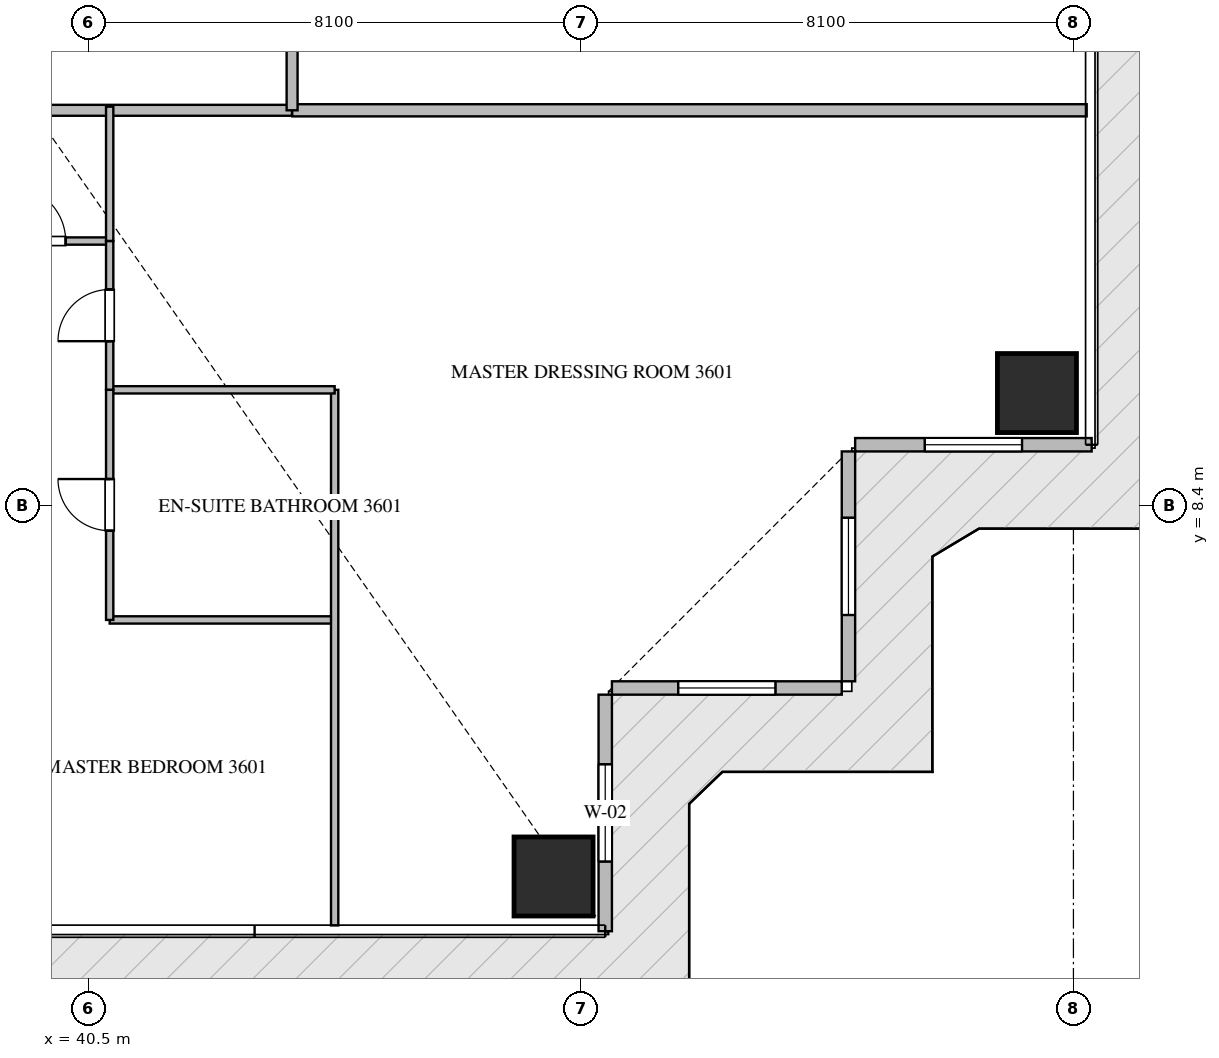
"""IFC4 building model, lengths in metres.
Left out: names, types, materials, properties, quantities, classifications, styles, units other than length and angle.
Written with IfcOpenShell. Run it as: python <this file> out.ifc"""

import sys

from ifc_helpers import new_model, si_unit, direction, frame, frame_2d, origin, origin_2d, place, context, subcontext, project, spatial, rectangle, extrude, source, transform, mapped, element, fill, save


model = new_model("IFC4")
c1 = context("Model", 3, precision=1e-05, world=origin(), true_north=direction((0.0, 1.0)))
c2 = subcontext(c1, "Body", "Model", "MODEL_VIEW")
j1 = project(units=[si_unit("LENGTHUNIT", "METRE"), si_unit("PLANEANGLEUNIT", "RADIAN")], contexts=[c1])
p1 = place(None, origin())
s1 = spatial("IfcSite", under=j1, at=p1, CompositionType="ELEMENT")
p2 = place(p1, origin())
s2 = spatial("IfcBuilding", under=s1, at=p2, CompositionType="ELEMENT")
p3 = place(p2, frame((0.0, 0.0, 146.4)))
s3 = spatial("IfcBuildingStorey", under=s2, at=p3, CompositionType="ELEMENT", Elevation=146.4)
m1 = source(origin(), c2, "Body", "SweptSolid", [
    extrude(rectangle(XDim=1.3, YDim=1.3, at=origin_2d()), origin(), (0.0, 0.0, 1.0), 3.75),
])
for number, where, z_axis, x_axis in (
    (1, (48.15, 2.3, -0.26), (0.0, 0.0, 1.0), (1.0, 0.0, 0.0)),
    (2, (56.1, 10.25, -0.26), (0.0, 0.0, 1.0), (1.0, 0.0, 0.0)),
):
    element("IfcColumn", number, at=place(p3, frame(where, z_axis=z_axis, x_axis=x_axis)), inside=s3, PredefinedType="COLUMN", context=c2, shape_type="MappedRepresentation", body=[
        mapped(m1, transform((0.0, 0.0, 0.0), scale=1.0)),
    ])
p4 = place(p3, frame((49.0, 1.4, 0.0), z_axis=(0.0, 0.0, 1.0), x_axis=(0.0, 1.0, 0.0)))
e3 = element("IfcWall", 3, at=p4, inside=s3, PredefinedType="ELEMENTEDWALL", context=c2, shape_type="SweptSolid", body=[
    extrude(rectangle(XDim=3.89, YDim=0.22, at=frame_2d((1.945, 0.0))), origin(), (0.0, 0.0, 1.0), 3.475),
])
p5 = place(p4, frame((1.145, 0.0, 0.65)))
e4 = element("IfcOpeningElement", 4, at=p5, cuts=e3, PredefinedType="OPENING", context=c2, shape_type="SweptSolid", body=[
    extrude(rectangle(XDim=1.6, YDim=2.1, at=frame_2d((0.8, 1.05))), frame((0.0, 0.12, 0.0), z_axis=(0.0, -1.0, 0.0), x_axis=(1.0, 0.0, 0.0)), (0.0, 0.0, 1.0), 0.24),
])
p6 = place(p3, frame((49.11, 5.4, 0.0), z_axis=(0.0, 0.0, 1.0), x_axis=(1.0, 0.0, 0.0)))
e5 = element("IfcWall", 5, at=p6, inside=s3, PredefinedType="ELEMENTEDWALL", context=c2, shape_type="SweptSolid", body=[
    extrude(rectangle(XDim=3.78, YDim=0.22, at=frame_2d((1.89, 0.0))), origin(), (0.0, 0.0, 1.0), 3.475),
])
p7 = place(p6, frame((1.09, 0.0, 0.65)))
e6 = element("IfcOpeningElement", 6, at=p7, cuts=e5, PredefinedType="OPENING", context=c2, shape_type="SweptSolid", body=[
    extrude(rectangle(XDim=1.6, YDim=2.1, at=frame_2d((0.8, 1.05))), frame((0.0, 0.12, 0.0), z_axis=(0.0, -1.0, 0.0), x_axis=(1.0, 0.0, 0.0)), (0.0, 0.0, 1.0), 0.24),
])
p8 = place(p3, frame((53.0, 5.51, 0.0), z_axis=(0.0, 0.0, 1.0), x_axis=(0.0, 1.0, 0.0)))
e7 = element("IfcWall", 7, at=p8, inside=s3, PredefinedType="ELEMENTEDWALL", context=c2, shape_type="SweptSolid", body=[
    extrude(rectangle(XDim=3.78, YDim=0.22, at=frame_2d((1.89, 0.0))), origin(), (0.0, 0.0, 1.0), 3.475),
])
p9 = place(p8, frame((1.09, 0.0, 0.65)))
e8 = element("IfcOpeningElement", 8, at=p9, cuts=e7, PredefinedType="OPENING", context=c2, shape_type="SweptSolid", body=[
    extrude(rectangle(XDim=1.6, YDim=2.1, at=frame_2d((0.8, 1.05))), frame((0.0, 0.12, 0.0), z_axis=(0.0, -1.0, 0.0), x_axis=(1.0, 0.0, 0.0)), (0.0, 0.0, 1.0), 0.24),
])
p10 = place(p3, frame((53.11, 9.4, 0.0), z_axis=(0.0, 0.0, 1.0), x_axis=(1.0, 0.0, 0.0)))
e9 = element("IfcWall", 9, at=p10, inside=s3, PredefinedType="ELEMENTEDWALL", context=c2, shape_type="SweptSolid", body=[
    extrude(rectangle(XDim=3.89, YDim=0.22, at=frame_2d((1.945, 0.0))), origin(), (0.0, 0.0, 1.0), 3.475),
])
p11 = place(p10, frame((1.145, 0.0, 0.65)))
e10 = element("IfcOpeningElement", 10, at=p11, cuts=e9, PredefinedType="OPENING", context=c2, shape_type="SweptSolid", body=[
    extrude(rectangle(XDim=1.6, YDim=2.1, at=frame_2d((0.8, 1.05))), frame((0.0, 0.12, 0.0), z_axis=(0.0, -1.0, 0.0), x_axis=(1.0, 0.0, 0.0)), (0.0, 0.0, 1.0), 0.24),
])
p12 = place(p3, frame((43.85, 14.9, 0.0), z_axis=(0.0, 0.0, 1.0), x_axis=(1.0, 0.0, 0.0)))
e11 = element("IfcWall", 11, at=p12, inside=s3, PredefinedType="PARTITIONING", context=c2, shape_type="SweptSolid", body=[
    extrude(rectangle(XDim=13.068, YDim=0.2, at=frame_2d((6.534, 0.0))), origin(), (0.0, 0.0, 1.0), 3.49),
])
p13 = place(p3, frame((20.952, 14.9, 0.0), z_axis=(0.0, 0.0, 1.0), x_axis=(1.0, 0.0, 0.0)))
e12 = element("IfcWall", 12, at=p13, inside=s3, PredefinedType="PARTITIONING", context=c2, shape_type="SweptSolid", body=[
    extrude(rectangle(XDim=22.896, YDim=0.18, at=frame_2d((11.448, 0.0))), origin(), (0.0, 0.0, 1.0), 3.49),
])
p14 = place(p13, frame((7.51, 0.0, 0.0)))
e13 = element("IfcOpeningElement", 13, at=p14, cuts=e12, PredefinedType="OPENING", context=c2, shape_type="SweptSolid", body=[
    extrude(rectangle(XDim=1.0, YDim=2.15, at=frame_2d((0.5, 1.075))), frame((0.0, 0.1, 0.0), z_axis=(0.0, -1.0, 0.0), x_axis=(1.0, 0.0, 0.0)), (0.0, 0.0, 1.0), 0.2),
])
p15 = place(p3, frame((43.85, 14.9, 0.0), z_axis=(0.0, 0.0, 1.0), x_axis=(0.0, 1.0, 0.0)))
e14 = element("IfcWall", 14, at=p15, inside=s3, PredefinedType="PARTITIONING", context=c2, shape_type="SweptSolid", body=[
    extrude(rectangle(XDim=18.7, YDim=0.18, at=frame_2d((9.35, 0.0))), origin(), (0.0, 0.0, 1.0), 3.49),
])
p16 = place(p15, frame((1.805, 0.0, 0.0)))
e15 = element("IfcOpeningElement", 15, at=p16, cuts=e14, PredefinedType="OPENING", context=c2, shape_type="SweptSolid", body=[
    extrude(rectangle(XDim=1.0, YDim=2.15, at=frame_2d((0.5, 1.075))), frame((0.0, 0.1, 0.0), z_axis=(0.0, -1.0, 0.0), x_axis=(1.0, 0.0, 0.0)), (0.0, 0.0, 1.0), 0.2),
])
p17 = place(p3, frame((38.502, 12.75, 0.0), z_axis=(0.0, 0.0, 1.0), x_axis=(1.0, 0.0, 0.0)))
e16 = element("IfcWall", 16, at=p17, inside=s3, PredefinedType="PARTITIONING", context=c2, shape_type="SweptSolid", body=[
    extrude(rectangle(XDim=2.348, YDim=0.12, at=frame_2d((1.174, 0.0))), origin(), (0.0, 0.0, 1.0), 3.49),
])
p18 = place(p17, frame((0.724, 0.0, 0.0)))
e17 = element("IfcOpeningElement", 17, at=p18, cuts=e16, PredefinedType="OPENING", context=c2, shape_type="SweptSolid", body=[
    extrude(rectangle(XDim=0.9, YDim=2.1, at=frame_2d((0.45, 1.05))), frame((0.0, 0.07, 0.0), z_axis=(0.0, -1.0, 0.0), x_axis=(1.0, 0.0, 0.0)), (0.0, 0.0, 1.0), 0.14),
])
p19 = place(p3, frame((40.85, 6.519, 0.0), z_axis=(0.0, 0.0, 1.0), x_axis=(1.0, 0.0, 0.0)))
e18 = element("IfcWall", 18, at=p19, inside=s3, PredefinedType="PARTITIONING", context=c2, shape_type="SweptSolid", body=[
    extrude(rectangle(XDim=3.7, YDim=0.12, at=frame_2d((1.85, 0.0))), origin(), (0.0, 0.0, 1.0), 3.49),
])
p20 = place(p3, frame((44.55, 1.495, 0.0), z_axis=(0.0, 0.0, 1.0), x_axis=(0.0, 1.0, 0.0)))
e19 = element("IfcWall", 19, at=p20, inside=s3, PredefinedType="PARTITIONING", context=c2, shape_type="SweptSolid", body=[
    extrude(rectangle(XDim=8.808, YDim=0.12, at=frame_2d((4.404, 0.0))), origin(), (0.0, 0.0, 1.0), 3.49),
])
p21 = place(p3, frame((40.85, 10.303, 0.0), z_axis=(0.0, 0.0, 1.0), x_axis=(1.0, 0.0, 0.0)))
e20 = element("IfcWall", 20, at=p21, inside=s3, PredefinedType="PARTITIONING", context=c2, shape_type="SweptSolid", body=[
    extrude(rectangle(XDim=3.7, YDim=0.12, at=frame_2d((1.85, 0.0))), origin(), (0.0, 0.0, 1.0), 2.972),
])
p22 = place(p3, frame((40.85, 6.519, 0.0), z_axis=(0.0, 0.0, 1.0), x_axis=(0.0, 1.0, 0.0)))
e21 = element("IfcWall", 21, at=p22, inside=s3, PredefinedType="PARTITIONING", context=c2, shape_type="SweptSolid", body=[
    extrude(rectangle(XDim=3.784, YDim=0.12, at=frame_2d((1.892, 0.0))), origin(), (0.0, 0.0, 1.0), 3.49),
])
p23 = place(p22, frame((1.467, 0.0, 0.0)))
e22 = element("IfcOpeningElement", 22, at=p23, cuts=e21, PredefinedType="OPENING", context=c2, shape_type="SweptSolid", body=[
    extrude(rectangle(XDim=0.85, YDim=2.1, at=frame_2d((0.425, 1.05))), frame((0.0, 0.07, 0.0), z_axis=(0.0, -1.0, 0.0), x_axis=(1.0, 0.0, 0.0)), (0.0, 0.0, 1.0), 0.14),
])
p24 = place(p3, frame((40.85, 10.305, 0.0), z_axis=(0.0, 0.0, 1.0), x_axis=(0.0, 1.0, 0.0)))
e23 = element("IfcWall", 23, at=p24, inside=s3, PredefinedType="PARTITIONING", context=c2, shape_type="SweptSolid", body=[
    extrude(rectangle(XDim=2.445, YDim=0.12, at=frame_2d((1.223, 0.0))), origin(), (0.0, 0.0, 1.0), 3.49),
])
p25 = place(p24, frame((0.798, 0.0, 0.0)))
e24 = element("IfcOpeningElement", 24, at=p25, cuts=e23, PredefinedType="OPENING", context=c2, shape_type="SweptSolid", body=[
    extrude(rectangle(XDim=0.85, YDim=2.1, at=frame_2d((0.425, 1.05))), frame((0.0, 0.07, 0.0), z_axis=(0.0, -1.0, 0.0), x_axis=(1.0, 0.0, 0.0)), (0.0, 0.0, 1.0), 0.14),
])
p26 = place(p3, frame((40.85, 12.752, 0.0), z_axis=(0.0, 0.0, 1.0), x_axis=(0.0, 1.0, 0.0)))
e25 = element("IfcWall", 25, at=p26, inside=s3, PredefinedType="PARTITIONING", context=c2, shape_type="SweptSolid", body=[
    extrude(rectangle(XDim=2.208, YDim=0.12, at=frame_2d((1.104, 0.0))), origin(), (0.0, 0.0, 1.0), 3.49),
])
m2 = source(origin(), c2, "Body", "SweptSolid", [
    extrude(rectangle(XDim=1.6, YDim=2.1, at=frame_2d((0.8, 1.05))), frame((0.0, 0.03, 0.0), z_axis=(0.0, -1.0, 0.0), x_axis=(1.0, 0.0, 0.0)), (0.0, 0.0, 1.0), 0.06),
])
p27 = place(p5, origin())
e26 = element("IfcWindow", 26, at=p27, inside=s3, PartitioningType="SINGLE_PANEL", PredefinedType="WINDOW", context=c2, shape_type="MappedRepresentation", body=[
    mapped(m2, transform((0.0, 0.0, 0.0), scale=1.0)),
])
fill(e4, e26)
p28 = place(p7, origin())
e27 = element("IfcWindow", 27, at=p28, inside=s3, PartitioningType="SINGLE_PANEL", PredefinedType="WINDOW", context=c2, shape_type="MappedRepresentation", body=[
    mapped(m2, transform((0.0, 0.0, 0.0), scale=1.0)),
])
fill(e6, e27)
p29 = place(p9, origin())
e28 = element("IfcWindow", 28, at=p29, inside=s3, PartitioningType="SINGLE_PANEL", PredefinedType="WINDOW", context=c2, shape_type="MappedRepresentation", body=[
    mapped(m2, transform((0.0, 0.0, 0.0), scale=1.0)),
])
fill(e8, e28)
p30 = place(p11, origin())
e29 = element("IfcWindow", 29, at=p30, inside=s3, PartitioningType="SINGLE_PANEL", PredefinedType="WINDOW", context=c2, shape_type="MappedRepresentation", body=[
    mapped(m2, transform((0.0, 0.0, 0.0), scale=1.0)),
])
fill(e10, e29)
m3 = source(origin(), c2, "Body", "SweptSolid", [
    extrude(rectangle(XDim=0.9, YDim=2.1, at=frame_2d((0.45, 1.05))), frame((0.0, 0.025, 0.0), z_axis=(0.0, -1.0, 0.0), x_axis=(1.0, 0.0, 0.0)), (0.0, 0.0, 1.0), 0.05),
])
p31 = place(p18, origin())
e30 = element("IfcDoor", 30, at=p31, inside=s3, OperationType="SINGLE_SWING_LEFT", PredefinedType="DOOR", context=c2, shape_type="MappedRepresentation", body=[
    mapped(m3, transform((0.0, 0.0, 0.0), scale=1.0)),
])
fill(e17, e30)
m4 = source(origin(), c2, "Body", "SweptSolid", [
    extrude(rectangle(XDim=0.85, YDim=2.1, at=frame_2d((0.425, 1.05))), frame((0.0, 0.025, 0.0), z_axis=(0.0, -1.0, 0.0), x_axis=(1.0, 0.0, 0.0)), (0.0, 0.0, 1.0), 0.05),
])
p32 = place(p23, origin())
e31 = element("IfcDoor", 31, at=p32, inside=s3, OperationType="SINGLE_SWING_RIGHT", PredefinedType="DOOR", context=c2, shape_type="MappedRepresentation", body=[
    mapped(m4, transform((0.0, 0.0, 0.0), scale=1.0)),
])
fill(e22, e31)
p33 = place(p25, origin())
e32 = element("IfcDoor", 32, at=p33, inside=s3, OperationType="SINGLE_SWING_LEFT", PredefinedType="DOOR", context=c2, shape_type="MappedRepresentation", body=[
    mapped(m4, transform((0.0, 0.0, 0.0), scale=1.0)),
])
fill(e24, e32)
save(model, sys.argv[1])
